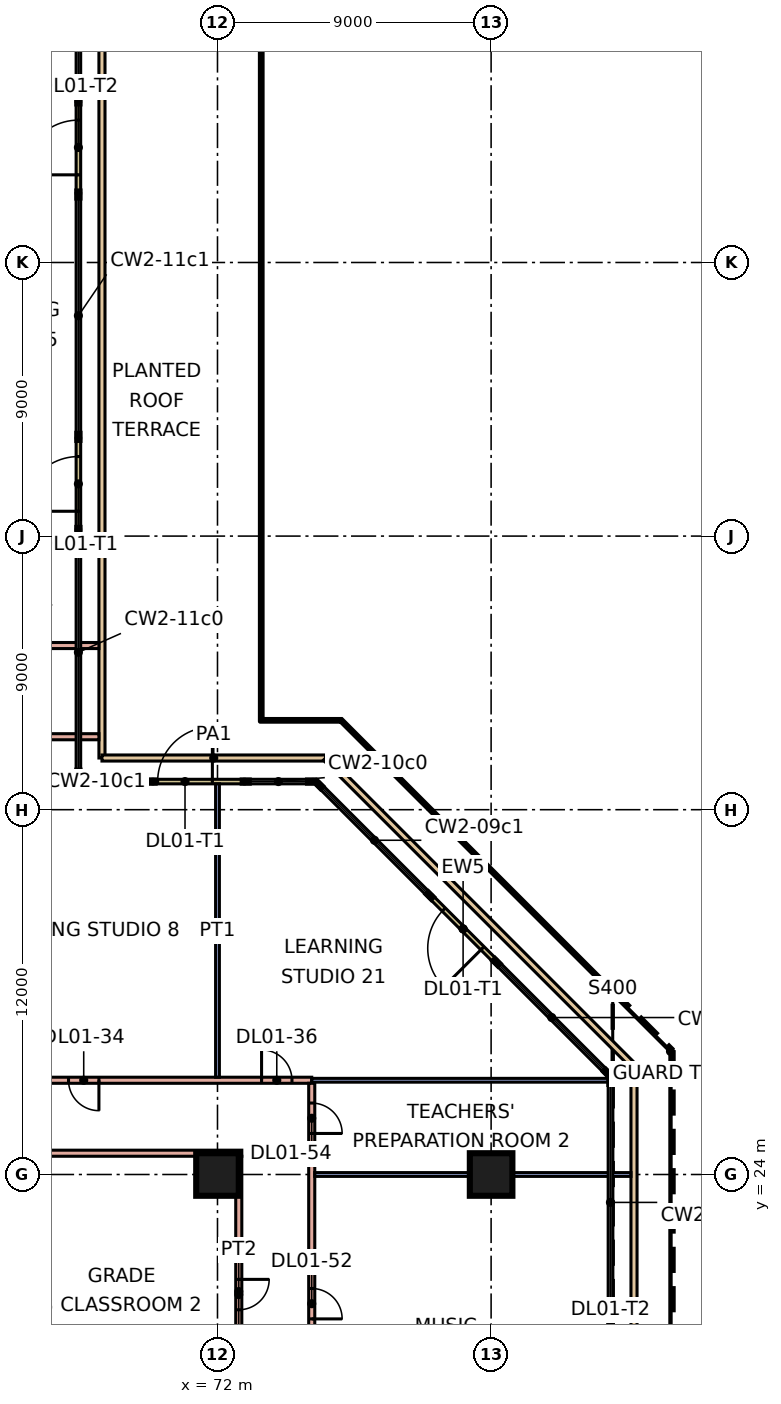
"""IFC4 building model, lengths in metres.
Left out: names, types, materials, properties, quantities, classifications, styles, units other than length and angle.
Written with IfcOpenShell. Run it as: python <this file> out.ifc"""

import sys

from ifc_helpers import new_model, si_unit, direction, frame, frame_2d, origin, origin_2d, place, context, subcontext, project, spatial, rectangle, extrude, element, fill, save


model = new_model("IFC4")
c1 = context("Model", 3, precision=1e-05, world=origin(), true_north=direction((0.0, 1.0)))
c2 = subcontext(c1, "Body", "Model", "MODEL_VIEW")
j1 = project(units=[si_unit("LENGTHUNIT", "METRE"), si_unit("PLANEANGLEUNIT", "RADIAN")], contexts=[c1])
p1 = place(None, origin())
s1 = spatial("IfcSite", under=j1, at=p1, CompositionType="ELEMENT")
p2 = place(p1, origin())
s2 = spatial("IfcBuilding", under=s1, at=p2, CompositionType="ELEMENT")
p3 = place(p2, frame((0.0, 0.0, 7.2)))
s3 = spatial("IfcBuildingStorey", under=s2, at=p3, CompositionType="ELEMENT", Elevation=7.2)
for number, where, z_axis, x_axis in (
    (1, (72.0, 24.0, 0.0), (0.0, 0.0, 1.0), (1.0, 0.0, 0.0)),
    (2, (81.0, 24.0, 0.0), (0.0, 0.0, 1.0), (1.0, 0.0, 0.0)),
):
    element("IfcColumn", number, at=place(p3, frame(where, z_axis=z_axis, x_axis=x_axis)), inside=s3, PredefinedType="COLUMN", context=c2, shape_type="SweptSolid", body=[
        extrude(rectangle(XDim=1.4, YDim=1.4, at=origin_2d()), origin(), (0.0, 0.0, 1.0), 4.8),
    ])
p4 = place(p3, frame((81.139, 31.018, 0.0), z_axis=(0.0, 0.0, 1.0), x_axis=(-0.707106781187, 0.707106781187, 0.0)))
e3 = element("IfcWall", 3, at=p4, inside=s3, PredefinedType="SOLIDWALL", context=c2, shape_type="SweptSolid", body=[
    extrude(rectangle(XDim=3.0, YDim=0.15, at=frame_2d((1.5, 0.0))), origin(), (0.0, 0.0, 1.0), 4.4),
])
p5 = place(p4, frame((0.6, 0.0, 0.0)))
e4 = element("IfcOpeningElement", 4, at=p5, cuts=e3, PredefinedType="OPENING", context=c2, shape_type="SweptSolid", body=[
    extrude(rectangle(XDim=1.8, YDim=2.4, at=frame_2d((0.9, 1.2))), frame((0.0, 0.085, 0.0), z_axis=(0.0, -1.0, 0.0), x_axis=(1.0, 0.0, 0.0)), (0.0, 0.0, 1.0), 0.17),
])
p6 = place(p3, frame((72.882, 36.925, 0.0), z_axis=(0.0, 0.0, 1.0), x_axis=(-1.0, 0.0, 0.0)))
e5 = element("IfcWall", 5, at=p6, inside=s3, PredefinedType="SOLIDWALL", context=c2, shape_type="SweptSolid", body=[
    extrude(rectangle(XDim=3.0, YDim=0.15, at=frame_2d((1.5, 0.0))), origin(), (0.0, 0.0, 1.0), 4.4),
])
p7 = place(p6, frame((1.05, 0.0, 0.0)))
e6 = element("IfcOpeningElement", 6, at=p7, cuts=e5, PredefinedType="OPENING", context=c2, shape_type="SweptSolid", body=[
    extrude(rectangle(XDim=1.8, YDim=2.4, at=frame_2d((0.9, 1.2))), frame((0.0, 0.085, 0.0), z_axis=(0.0, -1.0, 0.0), x_axis=(1.0, 0.0, 0.0)), (0.0, 0.0, 1.0), 0.17),
])
p8 = place(p3, frame((67.425, 45.217, 0.0), z_axis=(0.0, 0.0, 1.0), x_axis=(0.0, 1.0, 0.0)))
e7 = element("IfcWall", 7, at=p8, inside=s3, PredefinedType="SOLIDWALL", context=c2, shape_type="SweptSolid", body=[
    extrude(rectangle(XDim=3.0, YDim=0.15, at=frame_2d((1.5, 0.0))), origin(), (0.0, 0.0, 1.0), 4.4),
])
p9 = place(p8, frame((0.6, 0.0, 0.0)))
e8 = element("IfcOpeningElement", 8, at=p9, cuts=e7, PredefinedType="OPENING", context=c2, shape_type="SweptSolid", body=[
    extrude(rectangle(XDim=1.8, YDim=2.4, at=frame_2d((0.9, 1.2))), frame((0.0, 0.085, 0.0), z_axis=(0.0, -1.0, 0.0), x_axis=(1.0, 0.0, 0.0)), (0.0, 0.0, 1.0), 0.17),
])
p10 = place(p3, frame((67.425, 56.283, 0.0), z_axis=(0.0, 0.0, 1.0), x_axis=(0.0, 1.0, 0.0)))
e9 = element("IfcWall", 9, at=p10, inside=s3, PredefinedType="SOLIDWALL", context=c2, shape_type="SweptSolid", body=[
    extrude(rectangle(XDim=3.0, YDim=0.15, at=frame_2d((1.5, 0.0))), origin(), (0.0, 0.0, 1.0), 4.4),
])
p11 = place(p10, frame((0.6, 0.0, 0.0)))
e10 = element("IfcOpeningElement", 10, at=p11, cuts=e9, PredefinedType="OPENING", context=c2, shape_type="SweptSolid", body=[
    extrude(rectangle(XDim=1.8, YDim=2.4, at=frame_2d((0.9, 1.2))), frame((0.0, 0.085, 0.0), z_axis=(0.0, -1.0, 0.0), x_axis=(1.0, 0.0, 0.0)), (0.0, 0.0, 1.0), 0.17),
])
p12 = place(p3, frame((68.2, 68.2, 0.0), z_axis=(0.0, 0.0, 1.0), x_axis=(0.0, -1.0, 0.0)))
e11 = element("IfcWall", 11, at=p12, inside=s3, PredefinedType="PARAPET", context=c2, shape_type="SweptSolid", body=[
    extrude(rectangle(XDim=30.5, YDim=0.2, at=frame_2d((15.25, 0.0))), origin(), (0.0, 0.0, 1.0), 0.5),
])
p13 = place(p3, frame((68.2, 37.7, 0.0), z_axis=(0.0, 0.0, 1.0), x_axis=(1.0, 0.0, 0.0)))
e12 = element("IfcWall", 12, at=p13, inside=s3, PredefinedType="PARAPET", context=c2, shape_type="SweptSolid", body=[
    extrude(rectangle(XDim=7.354, YDim=0.2, at=frame_2d((3.677, 0.0))), origin(), (0.0, 0.0, 1.0), 0.5),
])
p14 = place(p3, frame((75.553, 37.7, 0.0), z_axis=(0.0, 0.0, 1.0), x_axis=(0.707106781187, -0.707106781187, 0.0)))
e13 = element("IfcWall", 13, at=p14, inside=s3, PredefinedType="PARAPET", context=c2, shape_type="SweptSolid", body=[
    extrude(rectangle(XDim=14.349, YDim=0.2, at=frame_2d((7.175, 0.0))), origin(), (0.0, 0.0, 1.0), 0.5),
])
p15 = place(p3, frame((85.7, 27.553, 0.0), z_axis=(0.0, 0.0, 1.0), x_axis=(0.0, -1.0, 0.0)))
e14 = element("IfcWall", 14, at=p15, inside=s3, PredefinedType="PARAPET", context=c2, shape_type="SweptSolid", body=[
    extrude(rectangle(XDim=31.107, YDim=0.2, at=frame_2d((15.553, 0.0))), origin(), (0.0, 0.0, 1.0), 0.5),
])
p16 = place(p3, frame((27.0, 38.4, 0.0), z_axis=(0.0, 0.0, 1.0), x_axis=(1.0, 0.0, 0.0)))
e15 = element("IfcWall", 15, at=p16, inside=s3, PredefinedType="PARTITIONING", context=c2, shape_type="SweptSolid", body=[
    extrude(rectangle(XDim=41.1, YDim=0.2, at=frame_2d((20.55, 0.0))), origin(), (0.0, 0.0, 1.0), 4.4),
])
p17 = place(p16, frame((21.9, 0.0, 0.0)))
e16 = element("IfcOpeningElement", 16, at=p17, cuts=e15, PredefinedType="OPENING", context=c2, shape_type="SweptSolid", body=[
    extrude(rectangle(XDim=1.0, YDim=2.1, at=frame_2d((0.5, 1.05))), frame((0.0, 0.11, 0.0), z_axis=(0.0, -1.0, 0.0), x_axis=(1.0, 0.0, 0.0)), (0.0, 0.0, 1.0), 0.22),
])
p18 = place(p16, frame((30.9, 0.0, 0.0)))
e17 = element("IfcOpeningElement", 17, at=p18, cuts=e15, PredefinedType="OPENING", context=c2, shape_type="SweptSolid", body=[
    extrude(rectangle(XDim=1.0, YDim=2.1, at=frame_2d((0.5, 1.05))), frame((0.0, 0.11, 0.0), z_axis=(0.0, -1.0, 0.0), x_axis=(1.0, 0.0, 0.0)), (0.0, 0.0, 1.0), 0.22),
])
p19 = place(p16, frame((37.65, 0.0, 0.0)))
e18 = element("IfcOpeningElement", 18, at=p19, cuts=e15, PredefinedType="OPENING", context=c2, shape_type="SweptSolid", body=[
    extrude(rectangle(XDim=1.0, YDim=2.1, at=frame_2d((0.5, 1.05))), frame((0.0, 0.11, 0.0), z_axis=(0.0, -1.0, 0.0), x_axis=(1.0, 0.0, 0.0)), (0.0, 0.0, 1.0), 0.22),
])
p20 = place(p16, frame((9.4, 0.0, 0.0)))
e19 = element("IfcOpeningElement", 19, at=p20, cuts=e15, PredefinedType="OPENING", context=c2, shape_type="SweptSolid", body=[
    extrude(rectangle(XDim=1.8, YDim=2.1, at=frame_2d((0.9, 1.05))), frame((0.0, 0.11, 0.0), z_axis=(0.0, -1.0, 0.0), x_axis=(1.0, 0.0, 0.0)), (0.0, 0.0, 1.0), 0.22),
])
p21 = place(p3, frame((36.1, 41.4, 0.0), z_axis=(0.0, 0.0, 1.0), x_axis=(1.0, 0.0, 0.0)))
e20 = element("IfcWall", 20, at=p21, inside=s3, PredefinedType="PARTITIONING", context=c2, shape_type="SweptSolid", body=[
    extrude(rectangle(XDim=32.0, YDim=0.2, at=frame_2d((16.0, 0.0))), origin(), (0.0, 0.0, 1.0), 4.4),
])
p22 = place(p21, frame((3.45, 0.0, 0.0)))
e21 = element("IfcOpeningElement", 21, at=p22, cuts=e20, PredefinedType="OPENING", context=c2, shape_type="SweptSolid", body=[
    extrude(rectangle(XDim=1.8, YDim=2.1, at=frame_2d((0.9, 1.05))), frame((0.0, 0.11, 0.0), z_axis=(0.0, -1.0, 0.0), x_axis=(1.0, 0.0, 0.0)), (0.0, 0.0, 1.0), 0.22),
])
p23 = place(p21, frame((6.95, 0.0, 0.0)))
e22 = element("IfcOpeningElement", 22, at=p23, cuts=e20, PredefinedType="OPENING", context=c2, shape_type="SweptSolid", body=[
    extrude(rectangle(XDim=1.8, YDim=2.1, at=frame_2d((0.9, 1.05))), frame((0.0, 0.11, 0.0), z_axis=(0.0, -1.0, 0.0), x_axis=(1.0, 0.0, 0.0)), (0.0, 0.0, 1.0), 0.22),
])
p24 = place(p21, frame((12.45, 0.0, 0.0)))
e23 = element("IfcOpeningElement", 23, at=p24, cuts=e20, PredefinedType="OPENING", context=c2, shape_type="SweptSolid", body=[
    extrude(rectangle(XDim=1.8, YDim=2.1, at=frame_2d((0.9, 1.05))), frame((0.0, 0.11, 0.0), z_axis=(0.0, -1.0, 0.0), x_axis=(1.0, 0.0, 0.0)), (0.0, 0.0, 1.0), 0.22),
])
p25 = place(p21, frame((15.95, 0.0, 0.0)))
e24 = element("IfcOpeningElement", 24, at=p25, cuts=e20, PredefinedType="OPENING", context=c2, shape_type="SweptSolid", body=[
    extrude(rectangle(XDim=1.8, YDim=2.1, at=frame_2d((0.9, 1.05))), frame((0.0, 0.11, 0.0), z_axis=(0.0, -1.0, 0.0), x_axis=(1.0, 0.0, 0.0)), (0.0, 0.0, 1.0), 0.22),
])
p26 = place(p21, frame((21.45, 0.0, 0.0)))
e25 = element("IfcOpeningElement", 25, at=p26, cuts=e20, PredefinedType="OPENING", context=c2, shape_type="SweptSolid", body=[
    extrude(rectangle(XDim=1.8, YDim=2.1, at=frame_2d((0.9, 1.05))), frame((0.0, 0.11, 0.0), z_axis=(0.0, -1.0, 0.0), x_axis=(1.0, 0.0, 0.0)), (0.0, 0.0, 1.0), 0.22),
])
p27 = place(p21, frame((24.95, 0.0, 0.0)))
e26 = element("IfcOpeningElement", 26, at=p27, cuts=e20, PredefinedType="OPENING", context=c2, shape_type="SweptSolid", body=[
    extrude(rectangle(XDim=1.8, YDim=2.1, at=frame_2d((0.9, 1.05))), frame((0.0, 0.11, 0.0), z_axis=(0.0, -1.0, 0.0), x_axis=(1.0, 0.0, 0.0)), (0.0, 0.0, 1.0), 0.22),
])
p28 = place(p21, frame((28.675, 0.0, 0.0)))
e27 = element("IfcOpeningElement", 27, at=p28, cuts=e20, PredefinedType="OPENING", context=c2, shape_type="SweptSolid", body=[
    extrude(rectangle(XDim=1.0, YDim=2.1, at=frame_2d((0.5, 1.05))), frame((0.0, 0.11, 0.0), z_axis=(0.0, -1.0, 0.0), x_axis=(1.0, 0.0, 0.0)), (0.0, 0.0, 1.0), 0.22),
])
p29 = place(p3, frame((38.3, 27.1, 0.0), z_axis=(0.0, 0.0, 1.0), x_axis=(1.0, 0.0, 0.0)))
e28 = element("IfcWall", 28, at=p29, inside=s3, PredefinedType="PARTITIONING", context=c2, shape_type="SweptSolid", body=[
    extrude(rectangle(XDim=36.8, YDim=0.2, at=frame_2d((18.4, 0.0))), origin(), (0.0, 0.0, 1.0), 4.4),
])
p30 = place(p29, frame((10.8, 0.0, 0.0)))
e29 = element("IfcOpeningElement", 29, at=p30, cuts=e28, PredefinedType="OPENING", context=c2, shape_type="SweptSolid", body=[
    extrude(rectangle(XDim=1.0, YDim=2.1, at=frame_2d((0.5, 1.05))), frame((0.0, 0.11, 0.0), z_axis=(0.0, -1.0, 0.0), x_axis=(1.0, 0.0, 0.0)), (0.0, 0.0, 1.0), 0.22),
])
p31 = place(p29, frame((19.8, 0.0, 0.0)))
e30 = element("IfcOpeningElement", 30, at=p31, cuts=e28, PredefinedType="OPENING", context=c2, shape_type="SweptSolid", body=[
    extrude(rectangle(XDim=1.0, YDim=2.1, at=frame_2d((0.5, 1.05))), frame((0.0, 0.11, 0.0), z_axis=(0.0, -1.0, 0.0), x_axis=(1.0, 0.0, 0.0)), (0.0, 0.0, 1.0), 0.22),
])
p32 = place(p29, frame((28.8, 0.0, 0.0)))
e31 = element("IfcOpeningElement", 31, at=p32, cuts=e28, PredefinedType="OPENING", context=c2, shape_type="SweptSolid", body=[
    extrude(rectangle(XDim=1.0, YDim=2.1, at=frame_2d((0.5, 1.05))), frame((0.0, 0.11, 0.0), z_axis=(0.0, -1.0, 0.0), x_axis=(1.0, 0.0, 0.0)), (0.0, 0.0, 1.0), 0.22),
])
p33 = place(p29, frame((35.15, 0.0, 0.0)))
e32 = element("IfcOpeningElement", 32, at=p33, cuts=e28, PredefinedType="OPENING", context=c2, shape_type="SweptSolid", body=[
    extrude(rectangle(XDim=1.0, YDim=2.1, at=frame_2d((0.5, 1.05))), frame((0.0, 0.11, 0.0), z_axis=(0.0, -1.0, 0.0), x_axis=(1.0, 0.0, 0.0)), (0.0, 0.0, 1.0), 0.22),
])
p34 = place(p3, frame((40.2, 24.7, 0.0), z_axis=(0.0, 0.0, 1.0), x_axis=(1.0, 0.0, 0.0)))
e33 = element("IfcWall", 33, at=p34, inside=s3, PredefinedType="PARTITIONING", context=c2, shape_type="SweptSolid", body=[
    extrude(rectangle(XDim=32.6, YDim=0.2, at=frame_2d((16.3, 0.0))), origin(), (0.0, 0.0, 1.0), 4.4),
])
p35 = place(p34, frame((2.65, 0.0, 0.0)))
e34 = element("IfcOpeningElement", 34, at=p35, cuts=e33, PredefinedType="OPENING", context=c2, shape_type="SweptSolid", body=[
    extrude(rectangle(XDim=1.0, YDim=2.1, at=frame_2d((0.5, 1.05))), frame((0.0, 0.11, 0.0), z_axis=(0.0, -1.0, 0.0), x_axis=(1.0, 0.0, 0.0)), (0.0, 0.0, 1.0), 0.22),
])
p36 = place(p34, frame((8.85, 0.0, 0.0)))
e35 = element("IfcOpeningElement", 35, at=p36, cuts=e33, PredefinedType="OPENING", context=c2, shape_type="SweptSolid", body=[
    extrude(rectangle(XDim=1.0, YDim=2.1, at=frame_2d((0.5, 1.05))), frame((0.0, 0.11, 0.0), z_axis=(0.0, -1.0, 0.0), x_axis=(1.0, 0.0, 0.0)), (0.0, 0.0, 1.0), 0.22),
])
p37 = place(p34, frame((15.05, 0.0, 0.0)))
e36 = element("IfcOpeningElement", 36, at=p37, cuts=e33, PredefinedType="OPENING", context=c2, shape_type="SweptSolid", body=[
    extrude(rectangle(XDim=1.0, YDim=2.1, at=frame_2d((0.5, 1.05))), frame((0.0, 0.11, 0.0), z_axis=(0.0, -1.0, 0.0), x_axis=(1.0, 0.0, 0.0)), (0.0, 0.0, 1.0), 0.22),
])
p38 = place(p34, frame((21.0, 0.0, 0.0)))
e37 = element("IfcOpeningElement", 37, at=p38, cuts=e33, PredefinedType="OPENING", context=c2, shape_type="SweptSolid", body=[
    extrude(rectangle(XDim=1.0, YDim=2.1, at=frame_2d((0.5, 1.05))), frame((0.0, 0.11, 0.0), z_axis=(0.0, -1.0, 0.0), x_axis=(1.0, 0.0, 0.0)), (0.0, 0.0, 1.0), 0.22),
])
p39 = place(p3, frame((72.0, 27.2, 0.0), z_axis=(0.0, 0.0, 1.0), x_axis=(0.0, 1.0, 0.0)))
e38 = element("IfcWall", 38, at=p39, inside=s3, PredefinedType="PARTITIONING", context=c2, shape_type="SweptSolid", body=[
    extrude(rectangle(XDim=9.651, YDim=0.125, at=frame_2d((4.826, 0.0))), origin(), (0.0, 0.0, 1.0), 4.4),
])
p40 = place(p3, frame((72.7, 15.7, 0.0), z_axis=(0.0, 0.0, 1.0), x_axis=(0.0, 1.0, 0.0)))
e39 = element("IfcWall", 39, at=p40, inside=s3, PredefinedType="PARTITIONING", context=c2, shape_type="SweptSolid", body=[
    extrude(rectangle(XDim=8.9, YDim=0.2, at=frame_2d((4.45, 0.0))), origin(), (0.0, 0.0, 1.0), 4.4),
])
p41 = place(p40, frame((3.85, 0.0, 0.0)))
e40 = element("IfcOpeningElement", 40, at=p41, cuts=e39, PredefinedType="OPENING", context=c2, shape_type="SweptSolid", body=[
    extrude(rectangle(XDim=1.0, YDim=2.1, at=frame_2d((0.5, 1.05))), frame((0.0, 0.11, 0.0), z_axis=(0.0, -1.0, 0.0), x_axis=(1.0, 0.0, 0.0)), (0.0, 0.0, 1.0), 0.22),
])
p42 = place(p3, frame((75.1, -3.0, 0.0), z_axis=(0.0, 0.0, 1.0), x_axis=(0.0, 1.0, 0.0)))
e41 = element("IfcWall", 41, at=p42, inside=s3, PredefinedType="PARTITIONING", context=c2, shape_type="SweptSolid", body=[
    extrude(rectangle(XDim=30.0, YDim=0.2, at=frame_2d((15.0, 0.0))), origin(), (0.0, 0.0, 1.0), 4.4),
])
p43 = place(p42, frame((0.55, 0.0, 0.0)))
e42 = element("IfcOpeningElement", 42, at=p43, cuts=e41, PredefinedType="OPENING", context=c2, shape_type="SweptSolid", body=[
    extrude(rectangle(XDim=1.0, YDim=2.1, at=frame_2d((0.5, 1.05))), frame((0.0, 0.11, 0.0), z_axis=(0.0, -1.0, 0.0), x_axis=(1.0, 0.0, 0.0)), (0.0, 0.0, 1.0), 0.22),
])
p44 = place(p42, frame((8.4, 0.0, 0.0)))
e43 = element("IfcOpeningElement", 43, at=p44, cuts=e41, PredefinedType="OPENING", context=c2, shape_type="SweptSolid", body=[
    extrude(rectangle(XDim=1.0, YDim=2.1, at=frame_2d((0.5, 1.05))), frame((0.0, 0.11, 0.0), z_axis=(0.0, -1.0, 0.0), x_axis=(1.0, 0.0, 0.0)), (0.0, 0.0, 1.0), 0.22),
])
p45 = place(p42, frame((3.15, 0.0, 0.0)))
e44 = element("IfcOpeningElement", 44, at=p45, cuts=e41, PredefinedType="OPENING", context=c2, shape_type="SweptSolid", body=[
    extrude(rectangle(XDim=1.0, YDim=2.1, at=frame_2d((0.5, 1.05))), frame((0.0, 0.11, 0.0), z_axis=(0.0, -1.0, 0.0), x_axis=(1.0, 0.0, 0.0)), (0.0, 0.0, 1.0), 0.22),
])
p46 = place(p42, frame((22.25, 0.0, 0.0)))
e45 = element("IfcOpeningElement", 45, at=p46, cuts=e41, PredefinedType="OPENING", context=c2, shape_type="SweptSolid", body=[
    extrude(rectangle(XDim=1.0, YDim=2.1, at=frame_2d((0.5, 1.05))), frame((0.0, 0.11, 0.0), z_axis=(0.0, -1.0, 0.0), x_axis=(1.0, 0.0, 0.0)), (0.0, 0.0, 1.0), 0.22),
])
p47 = place(p42, frame((18.75, 0.0, 0.0)))
e46 = element("IfcOpeningElement", 46, at=p47, cuts=e41, PredefinedType="OPENING", context=c2, shape_type="SweptSolid", body=[
    extrude(rectangle(XDim=1.0, YDim=2.1, at=frame_2d((0.5, 1.05))), frame((0.0, 0.11, 0.0), z_axis=(0.0, -1.0, 0.0), x_axis=(1.0, 0.0, 0.0)), (0.0, 0.0, 1.0), 0.22),
])
p48 = place(p42, frame((28.35, 0.0, 0.0)))
e47 = element("IfcOpeningElement", 47, at=p48, cuts=e41, PredefinedType="OPENING", context=c2, shape_type="SweptSolid", body=[
    extrude(rectangle(XDim=1.0, YDim=2.1, at=frame_2d((0.5, 1.05))), frame((0.0, 0.11, 0.0), z_axis=(0.0, -1.0, 0.0), x_axis=(1.0, 0.0, 0.0)), (0.0, 0.0, 1.0), 0.22),
])
p49 = place(p3, frame((75.1, 27.1, 0.0), z_axis=(0.0, 0.0, 1.0), x_axis=(1.0, 0.0, 0.0)))
e48 = element("IfcWall", 48, at=p49, inside=s3, PredefinedType="PARTITIONING", context=c2, shape_type="SweptSolid", body=[
    extrude(rectangle(XDim=10.5, YDim=0.125, at=frame_2d((5.25, 0.0))), origin(), (0.0, 0.0, 1.0), 4.4),
])
p50 = place(p3, frame((75.2, 24.0, 0.0), z_axis=(0.0, 0.0, 1.0), x_axis=(1.0, 0.0, 0.0)))
e49 = element("IfcWall", 49, at=p50, inside=s3, PredefinedType="PARTITIONING", context=c2, shape_type="SweptSolid", body=[
    extrude(rectangle(XDim=10.4, YDim=0.125, at=frame_2d((5.2, 0.0))), origin(), (0.0, 0.0, 1.0), 4.4),
])
p51 = place(p5, origin())
e50 = element("IfcDoor", 50, at=p51, inside=s3, OperationType="DOUBLE_DOOR_SINGLE_SWING", PredefinedType="DOOR", context=c2, shape_type="SweptSolid", body=[
    extrude(rectangle(XDim=1.8, YDim=2.4, at=frame_2d((0.9, 1.2))), frame((0.0, 0.025, 0.0), z_axis=(0.0, -1.0, 0.0), x_axis=(1.0, 0.0, 0.0)), (0.0, 0.0, 1.0), 0.05),
])
fill(e4, e50)
p52 = place(p7, frame((1.8, 0.0, 0.0), z_axis=(0.0, 0.0, 1.0), x_axis=(-1.0, 0.0, 0.0)))
e51 = element("IfcDoor", 51, at=p52, inside=s3, OperationType="DOUBLE_DOOR_SINGLE_SWING", PredefinedType="DOOR", context=c2, shape_type="SweptSolid", body=[
    extrude(rectangle(XDim=1.8, YDim=2.4, at=frame_2d((0.9, 1.2))), frame((0.0, 0.025, 0.0), z_axis=(0.0, -1.0, 0.0), x_axis=(1.0, 0.0, 0.0)), (0.0, 0.0, 1.0), 0.05),
])
fill(e6, e51)
p53 = place(p9, origin())
e52 = element("IfcDoor", 52, at=p53, inside=s3, OperationType="DOUBLE_DOOR_SINGLE_SWING", PredefinedType="DOOR", context=c2, shape_type="SweptSolid", body=[
    extrude(rectangle(XDim=1.8, YDim=2.4, at=frame_2d((0.9, 1.2))), frame((0.0, 0.025, 0.0), z_axis=(0.0, -1.0, 0.0), x_axis=(1.0, 0.0, 0.0)), (0.0, 0.0, 1.0), 0.05),
])
fill(e8, e52)
p54 = place(p11, origin())
e53 = element("IfcDoor", 53, at=p54, inside=s3, OperationType="DOUBLE_DOOR_SINGLE_SWING", PredefinedType="DOOR", context=c2, shape_type="SweptSolid", body=[
    extrude(rectangle(XDim=1.8, YDim=2.4, at=frame_2d((0.9, 1.2))), frame((0.0, 0.025, 0.0), z_axis=(0.0, -1.0, 0.0), x_axis=(1.0, 0.0, 0.0)), (0.0, 0.0, 1.0), 0.05),
])
fill(e10, e53)
p55 = place(p41, origin())
e54 = element("IfcDoor", 54, at=p55, inside=s3, OperationType="SINGLE_SWING_RIGHT", PredefinedType="DOOR", context=c2, shape_type="SweptSolid", body=[
    extrude(rectangle(XDim=1.0, YDim=2.1, at=frame_2d((0.5, 1.05))), frame((0.0, 0.025, 0.0), z_axis=(0.0, -1.0, 0.0), x_axis=(1.0, 0.0, 0.0)), (0.0, 0.0, 1.0), 0.05),
])
fill(e40, e54)
p56 = place(p32, origin())
e55 = element("IfcDoor", 55, at=p56, inside=s3, OperationType="SINGLE_SWING_RIGHT", PredefinedType="DOOR", context=c2, shape_type="SweptSolid", body=[
    extrude(rectangle(XDim=1.0, YDim=2.1, at=frame_2d((0.5, 1.05))), frame((0.0, 0.025, 0.0), z_axis=(0.0, -1.0, 0.0), x_axis=(1.0, 0.0, 0.0)), (0.0, 0.0, 1.0), 0.05),
])
fill(e31, e55)
p57 = place(p33, origin())
e56 = element("IfcDoor", 56, at=p57, inside=s3, OperationType="SINGLE_SWING_LEFT", PredefinedType="DOOR", context=c2, shape_type="SweptSolid", body=[
    extrude(rectangle(XDim=1.0, YDim=2.1, at=frame_2d((0.5, 1.05))), frame((0.0, 0.025, 0.0), z_axis=(0.0, -1.0, 0.0), x_axis=(1.0, 0.0, 0.0)), (0.0, 0.0, 1.0), 0.05),
])
fill(e32, e56)
p58 = place(p46, frame((1.0, 0.0, 0.0), z_axis=(0.0, 0.0, 1.0), x_axis=(-1.0, 0.0, 0.0)))
e57 = element("IfcDoor", 57, at=p58, inside=s3, OperationType="SINGLE_SWING_LEFT", PredefinedType="DOOR", context=c2, shape_type="SweptSolid", body=[
    extrude(rectangle(XDim=1.0, YDim=2.1, at=frame_2d((0.5, 1.05))), frame((0.0, 0.025, 0.0), z_axis=(0.0, -1.0, 0.0), x_axis=(1.0, 0.0, 0.0)), (0.0, 0.0, 1.0), 0.05),
])
fill(e45, e57)
p59 = place(p48, frame((1.0, 0.0, 0.0), z_axis=(0.0, 0.0, 1.0), x_axis=(-1.0, 0.0, 0.0)))
e58 = element("IfcDoor", 58, at=p59, inside=s3, OperationType="SINGLE_SWING_LEFT", PredefinedType="DOOR", context=c2, shape_type="SweptSolid", body=[
    extrude(rectangle(XDim=1.0, YDim=2.1, at=frame_2d((0.5, 1.05))), frame((0.0, 0.025, 0.0), z_axis=(0.0, -1.0, 0.0), x_axis=(1.0, 0.0, 0.0)), (0.0, 0.0, 1.0), 0.05),
])
fill(e47, e58)
save(model, sys.argv[1])
